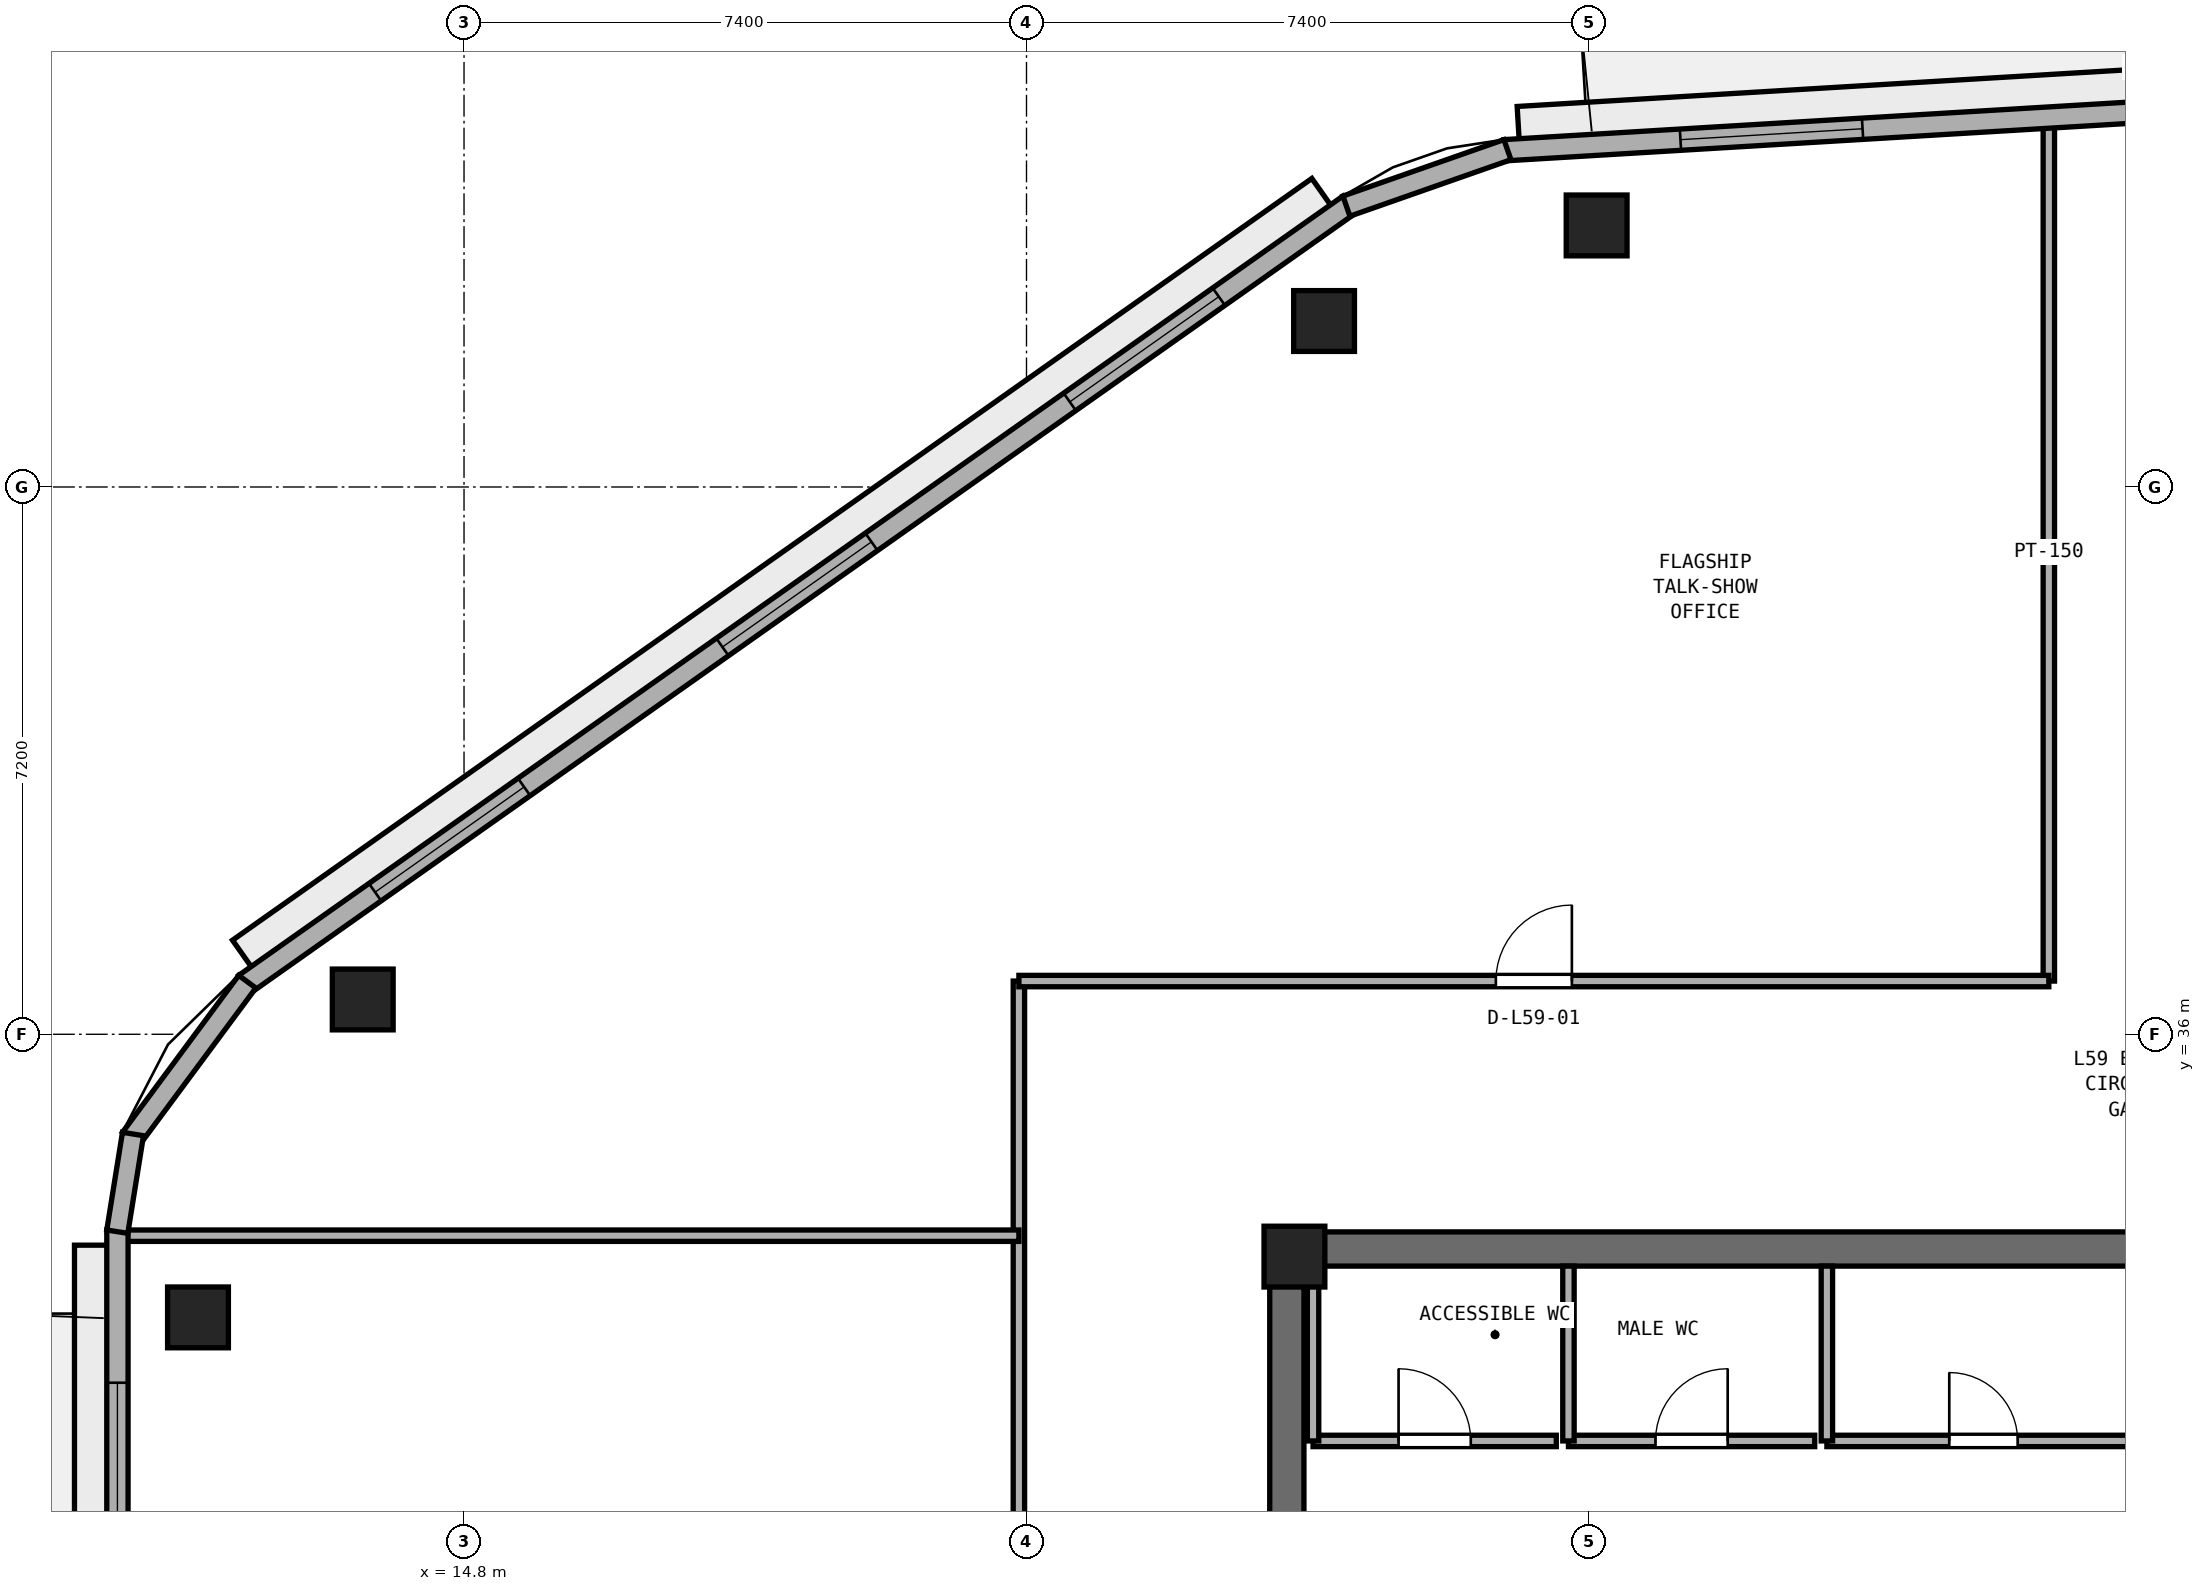
"""IFC4 building model, lengths in metres.
Left out: names, types, materials, properties, quantities, classifications, styles, units other than length and angle.
Written with IfcOpenShell. Run it as: python <this file> out.ifc"""

import sys

from ifc_helpers import new_model, si_unit, direction, frame, frame_2d, origin, origin_2d, place, context, subcontext, project, spatial, rectangle, extrude, element, fill, save


model = new_model("IFC4")
c1 = context("Model", 3, precision=1e-05, world=origin(), true_north=direction((0.0, 1.0)))
c2 = subcontext(c1, "Body", "Model", "MODEL_VIEW")
j1 = project(units=[si_unit("LENGTHUNIT", "METRE"), si_unit("PLANEANGLEUNIT", "RADIAN")], contexts=[c1])
p1 = place(None, origin())
s1 = spatial("IfcSite", under=j1, at=p1, CompositionType="ELEMENT")
p2 = place(p1, origin())
s2 = spatial("IfcBuilding", under=s1, at=p2, CompositionType="ELEMENT")
p3 = place(p2, frame((0.0, 0.0, 232.6)))
s3 = spatial("IfcBuildingStorey", under=s2, at=p3, CompositionType="ELEMENT", Elevation=232.6)
p4 = place(p3, frame((25.4, 33.175, 0.0), z_axis=(0.0, 0.0, 1.0), x_axis=(1.0, 0.0, 0.0)))
e1 = element("IfcWall", 1, at=p4, inside=s3, PredefinedType="SHEAR", context=c2, shape_type="SweptSolid", body=[
    extrude(rectangle(XDim=23.2, YDim=0.45, at=frame_2d((11.6, 0.0))), origin(), (0.0, 0.0, 1.0), 3.51),
])
p5 = place(p3, frame((25.625, 17.45, 0.0), z_axis=(0.0, 0.0, 1.0), x_axis=(0.0, 1.0, 0.0)))
e2 = element("IfcWall", 2, at=p5, inside=s3, PredefinedType="SHEAR", context=c2, shape_type="SweptSolid", body=[
    extrude(rectangle(XDim=15.5, YDim=0.45, at=frame_2d((7.75, 0.0))), origin(), (0.0, 0.0, 1.0), 3.51),
])
p6 = place(p5, frame((7.0, 0.0, 0.0)))
e3 = element("IfcOpeningElement", 3, at=p6, cuts=e2, PredefinedType="OPENING", context=c2, shape_type="SweptSolid", body=[
    extrude(rectangle(XDim=1.5, YDim=2.15, at=frame_2d((0.75, 1.075))), frame((0.0, 0.235, 0.0), z_axis=(0.0, -1.0, 0.0), x_axis=(1.0, 0.0, 0.0)), (0.0, 0.0, 1.0), 0.47),
])
p7 = place(p3, frame((25.725, 33.075, 0.0), z_axis=(0.0, 0.0, 1.0), x_axis=(1.0, 0.0, 0.0)))
e4 = element("IfcColumn", 4, at=p7, inside=s3, PredefinedType="PILASTER", context=c2, shape_type="SweptSolid", body=[
    extrude(rectangle(XDim=0.8, YDim=0.8, at=origin_2d()), origin(), (0.0, 0.0, 1.0), 3.8),
])
for number, where, z_axis, x_axis in (
    (5, (29.701, 46.641, 0.0), (0.0, 0.0, 1.0), (1.0, 0.0, 0.0)),
    (6, (26.115, 45.384, 0.0), (0.0, 0.0, 1.0), (1.0, 0.0, 0.0)),
    (7, (13.467, 36.458, 0.0), (0.0, 0.0, 1.0), (1.0, 0.0, 0.0)),
    (8, (11.3, 32.275, 0.0), (0.0, 0.0, 1.0), (1.0, 0.0, 0.0)),
):
    element("IfcColumn", number, at=place(p3, frame(where, z_axis=z_axis, x_axis=x_axis)), inside=s3, PredefinedType="COLUMN", context=c2, shape_type="SweptSolid", body=[
        extrude(rectangle(XDim=0.8, YDim=0.8, at=origin_2d()), origin(), (0.0, 0.0, 1.0), 3.8),
    ])
p8 = place(p3, frame((25.97, 30.65, 0.0), z_axis=(0.0, 0.0, 1.0), x_axis=(1.0, 0.0, 0.0)))
e9 = element("IfcWall", 9, at=p8, inside=s3, PredefinedType="PARTITIONING", context=c2, shape_type="SweptSolid", body=[
    extrude(rectangle(XDim=3.2, YDim=0.15, at=frame_2d((1.6, 0.0))), origin(), (0.0, 0.0, 1.0), 3.51),
])
p9 = place(p8, frame((1.125, 0.0, 0.0)))
e10 = element("IfcOpeningElement", 10, at=p9, cuts=e9, PredefinedType="OPENING", context=c2, shape_type="SweptSolid", body=[
    extrude(rectangle(XDim=0.95, YDim=2.1, at=frame_2d((0.475, 1.05))), frame((0.0, 0.085, 0.0), z_axis=(0.0, -1.0, 0.0), x_axis=(1.0, 0.0, 0.0)), (0.0, 0.0, 1.0), 0.17),
])
p10 = place(p3, frame((25.97, 30.65, 0.0), z_axis=(0.0, 0.0, 1.0), x_axis=(0.0, 1.0, 0.0)))
e11 = element("IfcWall", 11, at=p10, inside=s3, PredefinedType="PARTITIONING", context=c2, shape_type="SweptSolid", body=[
    extrude(rectangle(XDim=2.3, YDim=0.15, at=frame_2d((1.15, 0.0))), origin(), (0.0, 0.0, 1.0), 2.61),
])
p11 = place(p3, frame((29.33, 30.65, 0.0), z_axis=(0.0, 0.0, 1.0), x_axis=(1.0, 0.0, 0.0)))
e12 = element("IfcWall", 12, at=p11, inside=s3, PredefinedType="PARTITIONING", context=c2, shape_type="SweptSolid", body=[
    extrude(rectangle(XDim=3.24, YDim=0.15, at=frame_2d((1.62, 0.0))), origin(), (0.0, 0.0, 1.0), 3.51),
])
p12 = place(p11, frame((1.145, 0.0, 0.0)))
e13 = element("IfcOpeningElement", 13, at=p12, cuts=e12, PredefinedType="OPENING", context=c2, shape_type="SweptSolid", body=[
    extrude(rectangle(XDim=0.95, YDim=2.1, at=frame_2d((0.475, 1.05))), frame((0.0, 0.085, 0.0), z_axis=(0.0, -1.0, 0.0), x_axis=(1.0, 0.0, 0.0)), (0.0, 0.0, 1.0), 0.17),
])
p13 = place(p3, frame((29.33, 30.65, 0.0), z_axis=(0.0, 0.0, 1.0), x_axis=(0.0, 1.0, 0.0)))
e14 = element("IfcWall", 14, at=p13, inside=s3, PredefinedType="PARTITIONING", context=c2, shape_type="SweptSolid", body=[
    extrude(rectangle(XDim=2.3, YDim=0.15, at=frame_2d((1.15, 0.0))), origin(), (0.0, 0.0, 1.0), 3.51),
])
p14 = place(p3, frame((32.73, 30.65, 0.0), z_axis=(0.0, 0.0, 1.0), x_axis=(1.0, 0.0, 0.0)))
e15 = element("IfcWall", 15, at=p14, inside=s3, PredefinedType="PARTITIONING", context=c2, shape_type="SweptSolid", body=[
    extrude(rectangle(XDim=4.12, YDim=0.15, at=frame_2d((2.06, 0.0))), origin(), (0.0, 0.0, 1.0), 3.51),
])
p15 = place(p14, frame((1.61, 0.0, 0.0)))
e16 = element("IfcOpeningElement", 16, at=p15, cuts=e15, PredefinedType="OPENING", context=c2, shape_type="SweptSolid", body=[
    extrude(rectangle(XDim=0.9, YDim=2.1, at=frame_2d((0.45, 1.05))), frame((0.0, 0.085, 0.0), z_axis=(0.0, -1.0, 0.0), x_axis=(1.0, 0.0, 0.0)), (0.0, 0.0, 1.0), 0.17),
])
p16 = place(p3, frame((32.73, 30.65, 0.0), z_axis=(0.0, 0.0, 1.0), x_axis=(0.0, 1.0, 0.0)))
e17 = element("IfcWall", 17, at=p16, inside=s3, PredefinedType="PARTITIONING", context=c2, shape_type="SweptSolid", body=[
    extrude(rectangle(XDim=2.3, YDim=0.15, at=frame_2d((1.15, 0.0))), origin(), (0.0, 0.0, 1.0), 3.51),
])
p17 = place(p3, frame((35.65, 36.7, 0.0), z_axis=(0.0, 0.0, 1.0), x_axis=(0.0, 1.0, 0.0)))
e18 = element("IfcWall", 18, at=p17, inside=s3, PredefinedType="PARTITIONING", context=c2, shape_type="SweptSolid", body=[
    extrude(rectangle(XDim=11.295, YDim=0.15, at=frame_2d((5.648, 0.0))), origin(), (0.0, 0.0, 1.0), 3.51),
])
p18 = place(p3, frame((22.1, 6.248, 0.0), z_axis=(0.0, 0.0, 1.0), x_axis=(0.0, 1.0, 0.0)))
e19 = element("IfcWall", 19, at=p18, inside=s3, PredefinedType="PARTITIONING", context=c2, shape_type="SweptSolid", body=[
    extrude(rectangle(XDim=30.452, YDim=0.15, at=frame_2d((15.226, 0.0))), origin(), (0.0, 0.0, 1.0), 3.51),
])
p19 = place(p18, frame((11.252, 0.0, 0.0)))
e20 = element("IfcOpeningElement", 20, at=p19, cuts=e19, PredefinedType="OPENING", context=c2, shape_type="SweptSolid", body=[
    extrude(rectangle(XDim=0.9, YDim=2.1, at=frame_2d((0.45, 1.05))), frame((0.0, 0.085, 0.0), z_axis=(0.0, -1.0, 0.0), x_axis=(1.0, 0.0, 0.0)), (0.0, 0.0, 1.0), 0.17),
])
p20 = place(p18, frame((21.077, 0.0, 0.0)))
e21 = element("IfcOpeningElement", 21, at=p20, cuts=e19, PredefinedType="OPENING", context=c2, shape_type="SweptSolid", body=[
    extrude(rectangle(XDim=0.9, YDim=2.1, at=frame_2d((0.45, 1.05))), frame((0.0, 0.085, 0.0), z_axis=(0.0, -1.0, 0.0), x_axis=(1.0, 0.0, 0.0)), (0.0, 0.0, 1.0), 0.17),
])
p21 = place(p3, frame((10.305, 33.35, 0.0), z_axis=(0.0, 0.0, 1.0), x_axis=(1.0, 0.0, 0.0)))
e22 = element("IfcWall", 22, at=p21, inside=s3, PredefinedType="PARTITIONING", context=c2, shape_type="SweptSolid", body=[
    extrude(rectangle(XDim=11.795, YDim=0.15, at=frame_2d((5.897, 0.0))), origin(), (0.0, 0.0, 1.0), 3.51),
])
p22 = place(p3, frame((22.1, 36.7, 0.0), z_axis=(0.0, 0.0, 1.0), x_axis=(1.0, 0.0, 0.0)))
e23 = element("IfcWall", 23, at=p22, inside=s3, PredefinedType="PARTITIONING", context=c2, shape_type="SweptSolid", body=[
    extrude(rectangle(XDim=13.55, YDim=0.15, at=frame_2d((6.775, 0.0))), origin(), (0.0, 0.0, 1.0), 3.51),
])
p23 = place(p22, frame((6.275, 0.0, 0.0)))
e24 = element("IfcOpeningElement", 24, at=p23, cuts=e23, PredefinedType="OPENING", context=c2, shape_type="SweptSolid", body=[
    extrude(rectangle(XDim=1.0, YDim=2.12, at=frame_2d((0.5, 1.06))), frame((0.0, 0.085, 0.0), z_axis=(0.0, -1.0, 0.0), x_axis=(1.0, 0.0, 0.0)), (0.0, 0.0, 1.0), 0.17),
])
p24 = place(p3, frame((47.566, 48.775, 0.0), z_axis=(0.0, 0.0, 1.0), x_axis=(-0.998202767485, -0.059926913695, 0.0)))
e25 = element("IfcWall", 25, at=p24, inside=s3, PredefinedType="STANDARD", context=c2, shape_type="SweptSolid", body=[
    extrude(rectangle(XDim=19.111, YDim=0.28, at=frame_2d((9.556, 0.0))), origin(), (0.0, 0.0, 1.0), 3.51),
])
p25 = place(p24, frame((9.656, 0.0, 0.0)))
e26 = element("IfcOpeningElement", 26, at=p25, cuts=e25, PredefinedType="OPENING", context=c2, shape_type="SweptSolid", body=[
    extrude(rectangle(XDim=1.1, YDim=2.2, at=frame_2d((0.55, 1.1))), frame((0.0, 0.15, 0.0), z_axis=(0.0, -1.0, 0.0), x_axis=(1.0, 0.0, 0.0)), (0.0, 0.0, 1.0), 0.3),
])
p26 = place(p24, frame((2.319, 0.0, 0.9)))
e27 = element("IfcOpeningElement", 27, at=p26, cuts=e25, PredefinedType="OPENING", context=c2, shape_type="SweptSolid", body=[
    extrude(rectangle(XDim=2.4, YDim=1.75, at=frame_2d((1.2, 0.875))), frame((0.0, 0.15, 0.0), z_axis=(0.0, -1.0, 0.0), x_axis=(1.0, 0.0, 0.0)), (0.0, 0.0, 1.0), 0.3),
])
p27 = place(p24, frame((14.392, 0.0, 0.9)))
e28 = element("IfcOpeningElement", 28, at=p27, cuts=e25, PredefinedType="OPENING", context=c2, shape_type="SweptSolid", body=[
    extrude(rectangle(XDim=2.4, YDim=1.75, at=frame_2d((1.2, 0.875))), frame((0.0, 0.15, 0.0), z_axis=(0.0, -1.0, 0.0), x_axis=(1.0, 0.0, 0.0)), (0.0, 0.0, 1.0), 0.3),
])
p28 = place(p3, frame((26.443, 46.913, 0.0), z_axis=(0.0, 0.0, 1.0), x_axis=(-0.817024179766, -0.576603407619, 0.0)))
e29 = element("IfcWall", 29, at=p28, inside=s3, PredefinedType="STANDARD", context=c2, shape_type="SweptSolid", body=[
    extrude(rectangle(XDim=17.78, YDim=0.28, at=frame_2d((8.89, 0.0))), origin(), (0.0, 0.0, 1.0), 3.51),
])
p29 = place(p28, frame((2.097, 0.0, 0.9)))
e30 = element("IfcOpeningElement", 30, at=p29, cuts=e29, PredefinedType="OPENING", context=c2, shape_type="SweptSolid", body=[
    extrude(rectangle(XDim=2.4, YDim=1.75, at=frame_2d((1.2, 0.875))), frame((0.0, 0.15, 0.0), z_axis=(0.0, -1.0, 0.0), x_axis=(1.0, 0.0, 0.0)), (0.0, 0.0, 1.0), 0.3),
])
p30 = place(p28, frame((7.69, 0.0, 0.9)))
e31 = element("IfcOpeningElement", 31, at=p30, cuts=e29, PredefinedType="OPENING", context=c2, shape_type="SweptSolid", body=[
    extrude(rectangle(XDim=2.4, YDim=1.75, at=frame_2d((1.2, 0.875))), frame((0.0, 0.15, 0.0), z_axis=(0.0, -1.0, 0.0), x_axis=(1.0, 0.0, 0.0)), (0.0, 0.0, 1.0), 0.3),
])
p31 = place(p28, frame((13.283, 0.0, 0.9)))
e32 = element("IfcOpeningElement", 32, at=p31, cuts=e29, PredefinedType="OPENING", context=c2, shape_type="SweptSolid", body=[
    extrude(rectangle(XDim=2.4, YDim=1.75, at=frame_2d((1.2, 0.875))), frame((0.0, 0.15, 0.0), z_axis=(0.0, -1.0, 0.0), x_axis=(1.0, 0.0, 0.0)), (0.0, 0.0, 1.0), 0.3),
])
p32 = place(p3, frame((10.24, 33.425, 0.0), z_axis=(0.0, 0.0, 1.0), x_axis=(0.0, -1.0, 0.0)))
e33 = element("IfcWall", 33, at=p32, inside=s3, PredefinedType="STANDARD", context=c2, shape_type="SweptSolid", body=[
    extrude(rectangle(XDim=17.257, YDim=0.28, at=frame_2d((8.628, 0.0))), origin(), (0.0, 0.0, 1.0), 3.51),
])
p33 = place(p32, frame((8.078, 0.0, 0.0)))
e34 = element("IfcOpeningElement", 34, at=p33, cuts=e33, PredefinedType="OPENING", context=c2, shape_type="SweptSolid", body=[
    extrude(rectangle(XDim=1.1, YDim=2.2, at=frame_2d((0.55, 1.1))), frame((0.0, 0.15, 0.0), z_axis=(0.0, -1.0, 0.0), x_axis=(1.0, 0.0, 0.0)), (0.0, 0.0, 1.0), 0.3),
])
p34 = place(p32, frame((2.01, 0.0, 0.9)))
e35 = element("IfcOpeningElement", 35, at=p34, cuts=e33, PredefinedType="OPENING", context=c2, shape_type="SweptSolid", body=[
    extrude(rectangle(XDim=2.4, YDim=1.75, at=frame_2d((1.2, 0.875))), frame((0.0, 0.15, 0.0), z_axis=(0.0, -1.0, 0.0), x_axis=(1.0, 0.0, 0.0)), (0.0, 0.0, 1.0), 0.3),
])
p35 = place(p32, frame((12.847, 0.0, 0.9)))
e36 = element("IfcOpeningElement", 36, at=p35, cuts=e33, PredefinedType="OPENING", context=c2, shape_type="SweptSolid", body=[
    extrude(rectangle(XDim=2.4, YDim=1.75, at=frame_2d((1.2, 0.875))), frame((0.0, 0.15, 0.0), z_axis=(0.0, -1.0, 0.0), x_axis=(1.0, 0.0, 0.0)), (0.0, 0.0, 1.0), 0.3),
])
p36 = place(p3, frame((28.527, 47.638, 0.0), z_axis=(0.0, 0.0, 1.0), x_axis=(-0.943686979207, -0.330839667022, 0.0)))
e37 = element("IfcWall", 37, at=p36, inside=s3, PredefinedType="STANDARD", context=c2, shape_type="SweptSolid", body=[
    extrude(rectangle(XDim=2.245, YDim=0.28, at=frame_2d((1.123, 0.0))), origin(), (0.0, 0.0, 1.0), 3.51),
])
p37 = place(p3, frame((11.948, 36.692, 0.0), z_axis=(0.0, 0.0, 1.0), x_axis=(-0.595170751493, -0.803599263668, 0.0)))
e38 = element("IfcWall", 38, at=p37, inside=s3, PredefinedType="STANDARD", context=c2, shape_type="SweptSolid", body=[
    extrude(rectangle(XDim=2.57, YDim=0.28, at=frame_2d((1.285, 0.0))), origin(), (0.0, 0.0, 1.0), 3.51),
])
p38 = place(p3, frame((10.445, 34.688, 0.0), z_axis=(0.0, 0.0, 1.0), x_axis=(-0.158524605336, -0.987355027081, 0.0)))
e39 = element("IfcWall", 39, at=p38, inside=s3, PredefinedType="STANDARD", context=c2, shape_type="SweptSolid", body=[
    extrude(rectangle(XDim=1.301, YDim=0.28, at=frame_2d((0.651, 0.0))), origin(), (0.0, 0.0, 1.0), 3.51),
])
p39 = place(p9, origin())
e40 = element("IfcDoor", 40, at=p39, inside=s3, OperationType="SINGLE_SWING_LEFT", PredefinedType="DOOR", context=c2, shape_type="SweptSolid", body=[
    extrude(rectangle(XDim=0.95, YDim=2.1, at=frame_2d((0.475, 1.05))), frame((0.0, 0.025, 0.0), z_axis=(0.0, -1.0, 0.0), x_axis=(1.0, 0.0, 0.0)), (0.0, 0.0, 1.0), 0.05),
])
fill(e10, e40)
p40 = place(p12, origin())
e41 = element("IfcDoor", 41, at=p40, inside=s3, OperationType="SINGLE_SWING_RIGHT", PredefinedType="DOOR", context=c2, shape_type="SweptSolid", body=[
    extrude(rectangle(XDim=0.95, YDim=2.1, at=frame_2d((0.475, 1.05))), frame((0.0, 0.025, 0.0), z_axis=(0.0, -1.0, 0.0), x_axis=(1.0, 0.0, 0.0)), (0.0, 0.0, 1.0), 0.05),
])
fill(e13, e41)
p41 = place(p15, origin())
e42 = element("IfcDoor", 42, at=p41, inside=s3, OperationType="SINGLE_SWING_LEFT", PredefinedType="DOOR", context=c2, shape_type="SweptSolid", body=[
    extrude(rectangle(XDim=0.9, YDim=2.1, at=frame_2d((0.45, 1.05))), frame((0.0, 0.025, 0.0), z_axis=(0.0, -1.0, 0.0), x_axis=(1.0, 0.0, 0.0)), (0.0, 0.0, 1.0), 0.05),
])
fill(e16, e42)
p42 = place(p23, origin())
e43 = element("IfcDoor", 43, at=p42, inside=s3, OperationType="SINGLE_SWING_RIGHT", PredefinedType="DOOR", context=c2, shape_type="SweptSolid", body=[
    extrude(rectangle(XDim=1.0, YDim=2.12, at=frame_2d((0.5, 1.06))), frame((0.0, 0.025, 0.0), z_axis=(0.0, -1.0, 0.0), x_axis=(1.0, 0.0, 0.0)), (0.0, 0.0, 1.0), 0.05),
])
fill(e24, e43)
p43 = place(p27, origin())
e44 = element("IfcWindow", 44, at=p43, inside=s3, PartitioningType="SINGLE_PANEL", PredefinedType="WINDOW", context=c2, shape_type="SweptSolid", body=[
    extrude(rectangle(XDim=2.4, YDim=1.75, at=frame_2d((1.2, 0.875))), frame((0.0, 0.03, 0.0), z_axis=(0.0, -1.0, 0.0), x_axis=(1.0, 0.0, 0.0)), (0.0, 0.0, 1.0), 0.06),
])
fill(e28, e44)
p44 = place(p29, origin())
e45 = element("IfcWindow", 45, at=p44, inside=s3, PartitioningType="SINGLE_PANEL", PredefinedType="WINDOW", context=c2, shape_type="SweptSolid", body=[
    extrude(rectangle(XDim=2.4, YDim=1.75, at=frame_2d((1.2, 0.875))), frame((0.0, 0.03, 0.0), z_axis=(0.0, -1.0, 0.0), x_axis=(1.0, 0.0, 0.0)), (0.0, 0.0, 1.0), 0.06),
])
fill(e30, e45)
p45 = place(p30, origin())
e46 = element("IfcWindow", 46, at=p45, inside=s3, PartitioningType="SINGLE_PANEL", PredefinedType="WINDOW", context=c2, shape_type="SweptSolid", body=[
    extrude(rectangle(XDim=2.4, YDim=1.75, at=frame_2d((1.2, 0.875))), frame((0.0, 0.03, 0.0), z_axis=(0.0, -1.0, 0.0), x_axis=(1.0, 0.0, 0.0)), (0.0, 0.0, 1.0), 0.06),
])
fill(e31, e46)
p46 = place(p31, origin())
e47 = element("IfcWindow", 47, at=p46, inside=s3, PartitioningType="SINGLE_PANEL", PredefinedType="WINDOW", context=c2, shape_type="SweptSolid", body=[
    extrude(rectangle(XDim=2.4, YDim=1.75, at=frame_2d((1.2, 0.875))), frame((0.0, 0.03, 0.0), z_axis=(0.0, -1.0, 0.0), x_axis=(1.0, 0.0, 0.0)), (0.0, 0.0, 1.0), 0.06),
])
fill(e32, e47)
p47 = place(p34, origin())
e48 = element("IfcWindow", 48, at=p47, inside=s3, PartitioningType="SINGLE_PANEL", PredefinedType="WINDOW", context=c2, shape_type="SweptSolid", body=[
    extrude(rectangle(XDim=2.4, YDim=1.75, at=frame_2d((1.2, 0.875))), frame((0.0, 0.03, 0.0), z_axis=(0.0, -1.0, 0.0), x_axis=(1.0, 0.0, 0.0)), (0.0, 0.0, 1.0), 0.06),
])
fill(e35, e48)
save(model, sys.argv[1])
